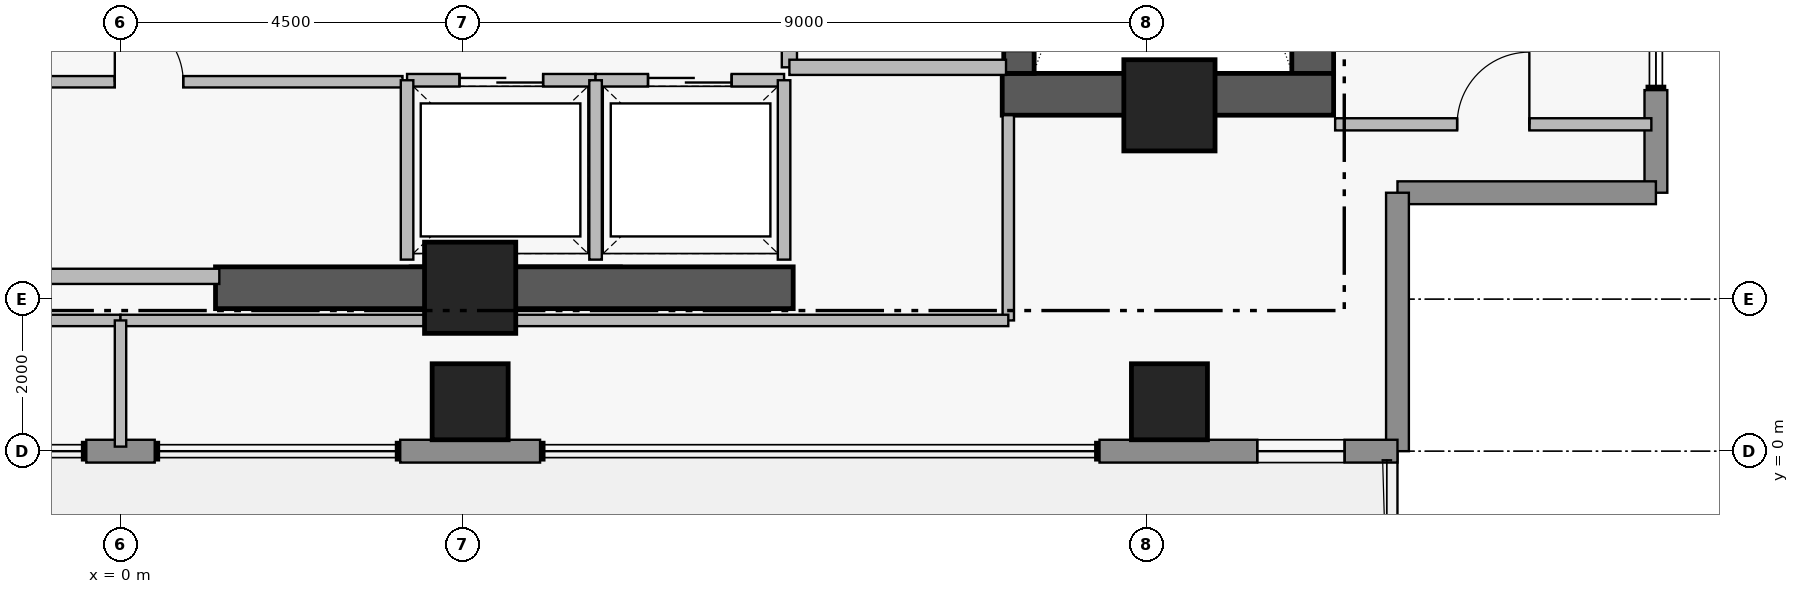
"""IFC4 building model, lengths in metres.
Left out: names, types, materials, properties, quantities, classifications, styles, units other than length and angle.
Written with IfcOpenShell. Run it as: python <this file> out.ifc"""

import sys

from ifc_helpers import new_model, si_unit, direction, frame, frame_2d, origin, origin_2d, place, context, subcontext, project, spatial, rectangle, extrude, element, fill, save


model = new_model("IFC4")
c1 = context("Model", 3, precision=1e-05, world=origin(), true_north=direction((0.0, 1.0)))
c2 = subcontext(c1, "Body", "Model", "MODEL_VIEW")
j1 = project(units=[si_unit("LENGTHUNIT", "METRE"), si_unit("PLANEANGLEUNIT", "RADIAN")], contexts=[c1])
p1 = place(None, origin())
s1 = spatial("IfcSite", under=j1, at=p1, CompositionType="ELEMENT")
p2 = place(p1, origin())
s2 = spatial("IfcBuilding", under=s1, at=p2, CompositionType="ELEMENT")
p3 = place(p2, frame((0.0, 0.0, 280.35)))
s3 = spatial("IfcBuildingStorey", under=s2, at=p3, CompositionType="ELEMENT", Elevation=280.35)
p4 = place(p3, frame((15.685, 4.97, 0.0), z_axis=(0.0, 0.0, 1.0), x_axis=(0.0, 1.0, 0.0)))
e1 = element("IfcWall", 1, at=p4, inside=s3, PredefinedType="SHEAR", context=c2, shape_type="SweptSolid", body=[
    extrude(rectangle(XDim=8.96, YDim=0.55, at=frame_2d((4.48, 0.0))), origin(), (0.0, 0.0, 1.0), 3.51),
])
p5 = place(p3, frame((11.6, 4.695, 0.0), z_axis=(0.0, 0.0, 1.0), x_axis=(1.0, 0.0, 0.0)))
e2 = element("IfcWall", 2, at=p5, inside=s3, PredefinedType="SHEAR", context=c2, shape_type="SweptSolid", body=[
    extrude(rectangle(XDim=4.36, YDim=0.55, at=frame_2d((2.18, 0.0))), origin(), (0.0, 0.0, 1.0), 3.51),
])
p6 = place(p3, frame((1.25, 2.15, 0.0), z_axis=(0.0, 0.0, 1.0), x_axis=(1.0, 0.0, 0.0)))
e3 = element("IfcWall", 3, at=p6, inside=s3, PredefinedType="SHEAR", context=c2, shape_type="SweptSolid", body=[
    extrude(rectangle(XDim=7.6, YDim=0.55, at=frame_2d((3.8, 0.0))), origin(), (0.0, 0.0, 1.0), 3.48),
])
p7 = place(p3, frame((11.82, 13.93, 0.0), z_axis=(0.0, 0.0, 1.0), x_axis=(0.0, -1.0, 0.0)))
e4 = element("IfcWall", 4, at=p7, inside=s3, PredefinedType="SHEAR", context=c2, shape_type="SweptSolid", body=[
    extrude(rectangle(XDim=8.96, YDim=0.4, at=frame_2d((4.48, 0.0))), origin(), (0.0, 0.0, 1.0), 3.51),
])
p8 = place(p7, frame((7.53, 0.0, 0.0)))
e5 = element("IfcOpeningElement", 5, at=p8, cuts=e4, PredefinedType="OPENING", context=c2, shape_type="SweptSolid", body=[
    extrude(rectangle(XDim=1.12, YDim=2.22, at=frame_2d((0.56, 1.11))), frame((0.0, 0.21, 0.0), z_axis=(0.0, -1.0, 0.0), x_axis=(1.0, 0.0, 0.0)), (0.0, 0.0, 1.0), 0.42),
])
for number, where, z_axis, x_axis in (
    (6, (4.6, 2.15, 0.0), (0.0, 0.0, 1.0), (1.0, 0.0, 0.0)),
    (7, (13.8, 4.55, 0.0), (0.0, 0.0, 1.0), (1.0, 0.0, 0.0)),
):
    element("IfcColumn", number, at=place(p3, frame(where, z_axis=z_axis, x_axis=x_axis)), inside=s3, PredefinedType="COLUMN", context=c2, shape_type="SweptSolid", body=[
        extrude(rectangle(XDim=1.2, YDim=1.2, at=origin_2d()), origin(), (0.0, 0.0, 1.0), 3.7),
    ])
for number, where, z_axis, x_axis in (
    (8, (4.6, 0.65, 0.0), (0.0, 0.0, 1.0), (1.0, 0.0, 0.0)),
    (9, (13.8, 0.65, 0.0), (0.0, 0.0, 1.0), (1.0, 0.0, 0.0)),
):
    element("IfcColumn", number, at=place(p3, frame(where, z_axis=z_axis, x_axis=x_axis)), inside=s3, PredefinedType="COLUMN", context=c2, shape_type="SweptSolid", body=[
        extrude(rectangle(XDim=1.0, YDim=1.0, at=origin_2d()), origin(), (0.0, 0.0, 1.0), 3.7),
    ])
p9 = place(p3, frame((20.2, 4.75, 0.0), z_axis=(0.0, 0.0, 1.0), x_axis=(0.0, -1.0, 0.0)))
e10 = element("IfcWall", 10, at=p9, inside=s3, PredefinedType="STANDARD", context=c2, shape_type="SweptSolid", body=[
    extrude(rectangle(XDim=1.35, YDim=0.3, at=frame_2d((0.675, 0.0))), origin(), (0.0, 0.0, 1.0), 3.48),
])
for number, where, z_axis, x_axis in (
    (11, (20.2, 3.4, 0.0), (0.0, 0.0, 1.0), (-1.0, 0.0, 0.0)),
    (12, (16.8, 3.4, 0.0), (0.0, 0.0, 1.0), (0.0, -1.0, 0.0)),
):
    element("IfcWall", number, at=place(p3, frame(where, z_axis=z_axis, x_axis=x_axis)), inside=s3, PredefinedType="STANDARD", context=c2, shape_type="SweptSolid", body=[
        extrude(rectangle(XDim=3.4, YDim=0.3, at=frame_2d((1.7, 0.0))), origin(), (0.0, 0.0, 1.0), 3.48),
    ])
p10 = place(p3, frame((16.8, 0.0, 0.0), z_axis=(0.0, 0.0, 1.0), x_axis=(-1.0, 0.0, 0.0)))
e13 = element("IfcWall", 13, at=p10, inside=s3, PredefinedType="STANDARD", context=c2, shape_type="SweptSolid", body=[
    extrude(rectangle(XDim=3.92, YDim=0.3, at=frame_2d((1.96, 0.0))), origin(), (0.0, 0.0, 1.0), 3.48),
])
p11 = place(p10, frame((0.695, 0.0, 0.95)))
e14 = element("IfcOpeningElement", 14, at=p11, cuts=e13, PredefinedType="OPENING", context=c2, shape_type="SweptSolid", body=[
    extrude(rectangle(XDim=1.15, YDim=1.55, at=frame_2d((0.575, 0.775))), frame((0.0, 0.16, 0.0), z_axis=(0.0, -1.0, 0.0), x_axis=(1.0, 0.0, 0.0)), (0.0, 0.0, 1.0), 0.32),
])
p12 = place(p3, frame((5.52, 0.0, 0.0), z_axis=(0.0, 0.0, 1.0), x_axis=(-1.0, 0.0, 0.0)))
e15 = element("IfcWall", 15, at=p12, inside=s3, PredefinedType="STANDARD", context=c2, shape_type="SweptSolid", body=[
    extrude(rectangle(XDim=1.84, YDim=0.3, at=frame_2d((0.92, 0.0))), origin(), (0.0, 0.0, 1.0), 3.48),
])
p13 = place(p3, frame((0.45, 0.0, 0.0), z_axis=(0.0, 0.0, 1.0), x_axis=(-1.0, 0.0, 0.0)))
e16 = element("IfcWall", 16, at=p13, inside=s3, PredefinedType="STANDARD", context=c2, shape_type="SweptSolid", body=[
    extrude(rectangle(XDim=0.9, YDim=0.3, at=frame_2d((0.45, 0.0))), origin(), (0.0, 0.0, 1.0), 3.48),
])
p14 = place(p3, frame((8.8, 11.15, 0.0), z_axis=(0.0, 0.0, 1.0), x_axis=(0.0, -1.0, 0.0)))
e17 = element("IfcWall", 17, at=p14, inside=s3, PredefinedType="PARTITIONING", context=c2, shape_type="SweptSolid", body=[
    extrude(rectangle(XDim=6.1, YDim=0.2, at=frame_2d((3.05, 0.0))), origin(), (0.0, 0.0, 1.0), 3.48),
])
p15 = place(p14, frame((1.15, 0.0, 0.0)))
e18 = element("IfcOpeningElement", 18, at=p15, cuts=e17, PredefinedType="OPENING", context=c2, shape_type="SweptSolid", body=[
    extrude(rectangle(XDim=1.1, YDim=2.2, at=frame_2d((0.55, 1.1))), frame((0.0, 0.11, 0.0), z_axis=(0.0, -1.0, 0.0), x_axis=(1.0, 0.0, 0.0)), (0.0, 0.0, 1.0), 0.22),
])
p16 = place(p14, frame((4.75, 0.0, 0.0)))
e19 = element("IfcOpeningElement", 19, at=p16, cuts=e17, PredefinedType="OPENING", context=c2, shape_type="SweptSolid", body=[
    extrude(rectangle(XDim=1.1, YDim=2.2, at=frame_2d((0.55, 1.1))), frame((0.0, 0.11, 0.0), z_axis=(0.0, -1.0, 0.0), x_axis=(1.0, 0.0, 0.0)), (0.0, 0.0, 1.0), 0.22),
])
p17 = place(p3, frame((3.77, 4.88, 0.0), z_axis=(0.0, 0.0, 1.0), x_axis=(1.0, 0.0, 0.0)))
e20 = element("IfcWall", 20, at=p17, inside=s3, PredefinedType="PARTITIONING", context=c2, shape_type="SweptSolid", body=[
    extrude(rectangle(XDim=2.48, YDim=0.165, at=frame_2d((1.24, 0.0))), origin(), (0.0, 0.0, 1.0), 3.48),
])
p18 = place(p17, frame((0.69, 0.0, 0.0)))
e21 = element("IfcOpeningElement", 21, at=p18, cuts=e20, PredefinedType="OPENING", context=c2, shape_type="SweptSolid", body=[
    extrude(rectangle(XDim=1.1, YDim=2.25, at=frame_2d((0.55, 1.125))), frame((0.0, 0.093, 0.0), z_axis=(0.0, -1.0, 0.0), x_axis=(1.0, 0.0, 0.0)), (0.0, 0.0, 1.0), 0.185),
])
p19 = place(p3, frame((6.25, 4.88, 0.0), z_axis=(0.0, 0.0, 1.0), x_axis=(1.0, 0.0, 0.0)))
e22 = element("IfcWall", 22, at=p19, inside=s3, PredefinedType="PARTITIONING", context=c2, shape_type="SweptSolid", body=[
    extrude(rectangle(XDim=2.48, YDim=0.165, at=frame_2d((1.24, 0.0))), origin(), (0.0, 0.0, 1.0), 3.48),
])
p20 = place(p19, frame((0.69, 0.0, 0.0)))
e23 = element("IfcOpeningElement", 23, at=p20, cuts=e22, PredefinedType="OPENING", context=c2, shape_type="SweptSolid", body=[
    extrude(rectangle(XDim=1.1, YDim=2.25, at=frame_2d((0.55, 1.125))), frame((0.0, 0.093, 0.0), z_axis=(0.0, -1.0, 0.0), x_axis=(1.0, 0.0, 0.0)), (0.0, 0.0, 1.0), 0.185),
])
p21 = place(p3, frame((-2.96, 4.86, 0.0), z_axis=(0.0, 0.0, 1.0), x_axis=(1.0, 0.0, 0.0)))
e24 = element("IfcWall", 24, at=p21, inside=s3, PredefinedType="PARTITIONING", context=c2, shape_type="SweptSolid", body=[
    extrude(rectangle(XDim=6.67, YDim=0.15, at=frame_2d((3.335, 0.0))), origin(), (0.0, 0.0, 1.0), 3.48),
])
p22 = place(p21, frame((2.885, 0.0, 0.0)))
e25 = element("IfcOpeningElement", 25, at=p22, cuts=e24, PredefinedType="OPENING", context=c2, shape_type="SweptSolid", body=[
    extrude(rectangle(XDim=0.9, YDim=2.15, at=frame_2d((0.45, 1.075))), frame((0.0, 0.085, 0.0), z_axis=(0.0, -1.0, 0.0), x_axis=(1.0, 0.0, 0.0)), (0.0, 0.0, 1.0), 0.17),
])
p23 = place(p3, frame((15.98, 4.3, 0.0), z_axis=(0.0, 0.0, 1.0), x_axis=(1.0, 0.0, 0.0)))
e26 = element("IfcWall", 26, at=p23, inside=s3, PredefinedType="PARTITIONING", context=c2, shape_type="SweptSolid", body=[
    extrude(rectangle(XDim=4.16, YDim=0.16, at=frame_2d((2.08, 0.0))), origin(), (0.0, 0.0, 1.0), 3.48),
])
p24 = place(p23, frame((1.605, 0.0, 0.0)))
e27 = element("IfcOpeningElement", 27, at=p24, cuts=e26, PredefinedType="OPENING", context=c2, shape_type="SweptSolid", body=[
    extrude(rectangle(XDim=0.95, YDim=2.15, at=frame_2d((0.475, 1.075))), frame((0.0, 0.09, 0.0), z_axis=(0.0, -1.0, 0.0), x_axis=(1.0, 0.0, 0.0)), (0.0, 0.0, 1.0), 0.18),
])
p25 = place(p3, frame((8.8, 5.05, 0.0), z_axis=(0.0, 0.0, 1.0), x_axis=(1.0, 0.0, 0.0)))
e28 = element("IfcWall", 28, at=p25, inside=s3, PredefinedType="PARTITIONING", context=c2, shape_type="SweptSolid", body=[
    extrude(rectangle(XDim=2.85, YDim=0.2, at=frame_2d((1.425, 0.0))), origin(), (0.0, 0.0, 1.0), 3.48),
])
for number, where, z_axis, x_axis in (
    (29, (3.77, 2.52, 0.0), (0.0, 0.0, 1.0), (0.0, 1.0, 0.0)),
    (30, (6.25, 2.52, 0.0), (0.0, 0.0, 1.0), (0.0, 1.0, 0.0)),
    (31, (8.73, 2.52, 0.0), (0.0, 0.0, 1.0), (0.0, 1.0, 0.0)),
):
    element("IfcWall", number, at=place(p3, frame(where, z_axis=z_axis, x_axis=x_axis)), inside=s3, PredefinedType="PARTITIONING", context=c2, shape_type="SweptSolid", body=[
        extrude(rectangle(XDim=2.36, YDim=0.165, at=frame_2d((1.18, 0.0))), origin(), (0.0, 0.0, 1.0), 3.48),
    ])
p26 = place(p3, frame((-1.3, 2.3, 0.0), z_axis=(0.0, 0.0, 1.0), x_axis=(1.0, 0.0, 0.0)))
e32 = element("IfcWall", 32, at=p26, inside=s3, PredefinedType="PARTITIONING", context=c2, shape_type="SweptSolid", body=[
    extrude(rectangle(XDim=2.6, YDim=0.2, at=frame_2d((1.3, 0.0))), origin(), (0.0, 0.0, 1.0), 2.38),
])
p27 = place(p3, frame((-11.68, 1.72, 0.0), z_axis=(0.0, 0.0, 1.0), x_axis=(1.0, 0.0, 0.0)))
e33 = element("IfcWall", 33, at=p27, inside=s3, PredefinedType="PARTITIONING", context=c2, shape_type="SweptSolid", body=[
    extrude(rectangle(XDim=11.68, YDim=0.15, at=frame_2d((5.84, 0.0))), origin(), (0.0, 0.0, 1.0), 2.38),
])
p28 = place(p3, frame((11.68, 1.72, 0.0), z_axis=(0.0, 0.0, 1.0), x_axis=(0.0, 1.0, 0.0)))
e34 = element("IfcWall", 34, at=p28, inside=s3, PredefinedType="PARTITIONING", context=c2, shape_type="SweptSolid", body=[
    extrude(rectangle(XDim=2.7, YDim=0.15, at=frame_2d((1.35, 0.0))), origin(), (0.0, 0.0, 1.0), 3.48),
])
p29 = place(p3, frame((0.0, 1.72, 0.0), z_axis=(0.0, 0.0, 1.0), x_axis=(1.0, 0.0, 0.0)))
e35 = element("IfcWall", 35, at=p29, inside=s3, PredefinedType="PARTITIONING", context=c2, shape_type="SweptSolid", body=[
    extrude(rectangle(XDim=11.68, YDim=0.15, at=frame_2d((5.84, 0.0))), origin(), (0.0, 0.0, 1.0), 2.38),
])
p30 = place(p3, frame((0.0, 0.06, 0.0), z_axis=(0.0, 0.0, 1.0), x_axis=(0.0, 1.0, 0.0)))
e36 = element("IfcWall", 36, at=p30, inside=s3, PredefinedType="PARTITIONING", context=c2, shape_type="SweptSolid", body=[
    extrude(rectangle(XDim=1.66, YDim=0.15, at=frame_2d((0.83, 0.0))), origin(), (0.0, 0.0, 1.0), 3.48),
])
p31 = place(p11, origin())
e37 = element("IfcWindow", 37, at=p31, inside=s3, PartitioningType="SINGLE_PANEL", PredefinedType="WINDOW", context=c2, shape_type="SweptSolid", body=[
    extrude(rectangle(XDim=1.15, YDim=1.55, at=frame_2d((0.575, 0.775))), frame((0.0, 0.03, 0.0), z_axis=(0.0, -1.0, 0.0), x_axis=(1.0, 0.0, 0.0)), (0.0, 0.0, 1.0), 0.06),
])
fill(e14, e37)
p32 = place(p18, origin())
e38 = element("IfcDoor", 38, at=p32, inside=s3, OperationType="SLIDING_TO_LEFT", PredefinedType="DOOR", context=c2, shape_type="SweptSolid", body=[
    extrude(rectangle(XDim=1.1, YDim=2.25, at=frame_2d((0.55, 1.125))), frame((0.0, 0.025, 0.0), z_axis=(0.0, -1.0, 0.0), x_axis=(1.0, 0.0, 0.0)), (0.0, 0.0, 1.0), 0.05),
])
fill(e21, e38)
p33 = place(p20, origin())
e39 = element("IfcDoor", 39, at=p33, inside=s3, OperationType="SLIDING_TO_LEFT", PredefinedType="DOOR", context=c2, shape_type="SweptSolid", body=[
    extrude(rectangle(XDim=1.1, YDim=2.25, at=frame_2d((0.55, 1.125))), frame((0.0, 0.025, 0.0), z_axis=(0.0, -1.0, 0.0), x_axis=(1.0, 0.0, 0.0)), (0.0, 0.0, 1.0), 0.05),
])
fill(e23, e39)
p34 = place(p22, origin())
e40 = element("IfcDoor", 40, at=p34, inside=s3, OperationType="SINGLE_SWING_LEFT", PredefinedType="DOOR", context=c2, shape_type="SweptSolid", body=[
    extrude(rectangle(XDim=0.9, YDim=2.15, at=frame_2d((0.45, 1.075))), frame((0.0, 0.025, 0.0), z_axis=(0.0, -1.0, 0.0), x_axis=(1.0, 0.0, 0.0)), (0.0, 0.0, 1.0), 0.05),
])
fill(e25, e40)
p35 = place(p24, origin())
e41 = element("IfcDoor", 41, at=p35, inside=s3, OperationType="SINGLE_SWING_RIGHT", PredefinedType="DOOR", context=c2, shape_type="SweptSolid", body=[
    extrude(rectangle(XDim=0.95, YDim=2.15, at=frame_2d((0.475, 1.075))), frame((0.0, 0.025, 0.0), z_axis=(0.0, -1.0, 0.0), x_axis=(1.0, 0.0, 0.0)), (0.0, 0.0, 1.0), 0.05),
])
fill(e27, e41)
save(model, sys.argv[1])
